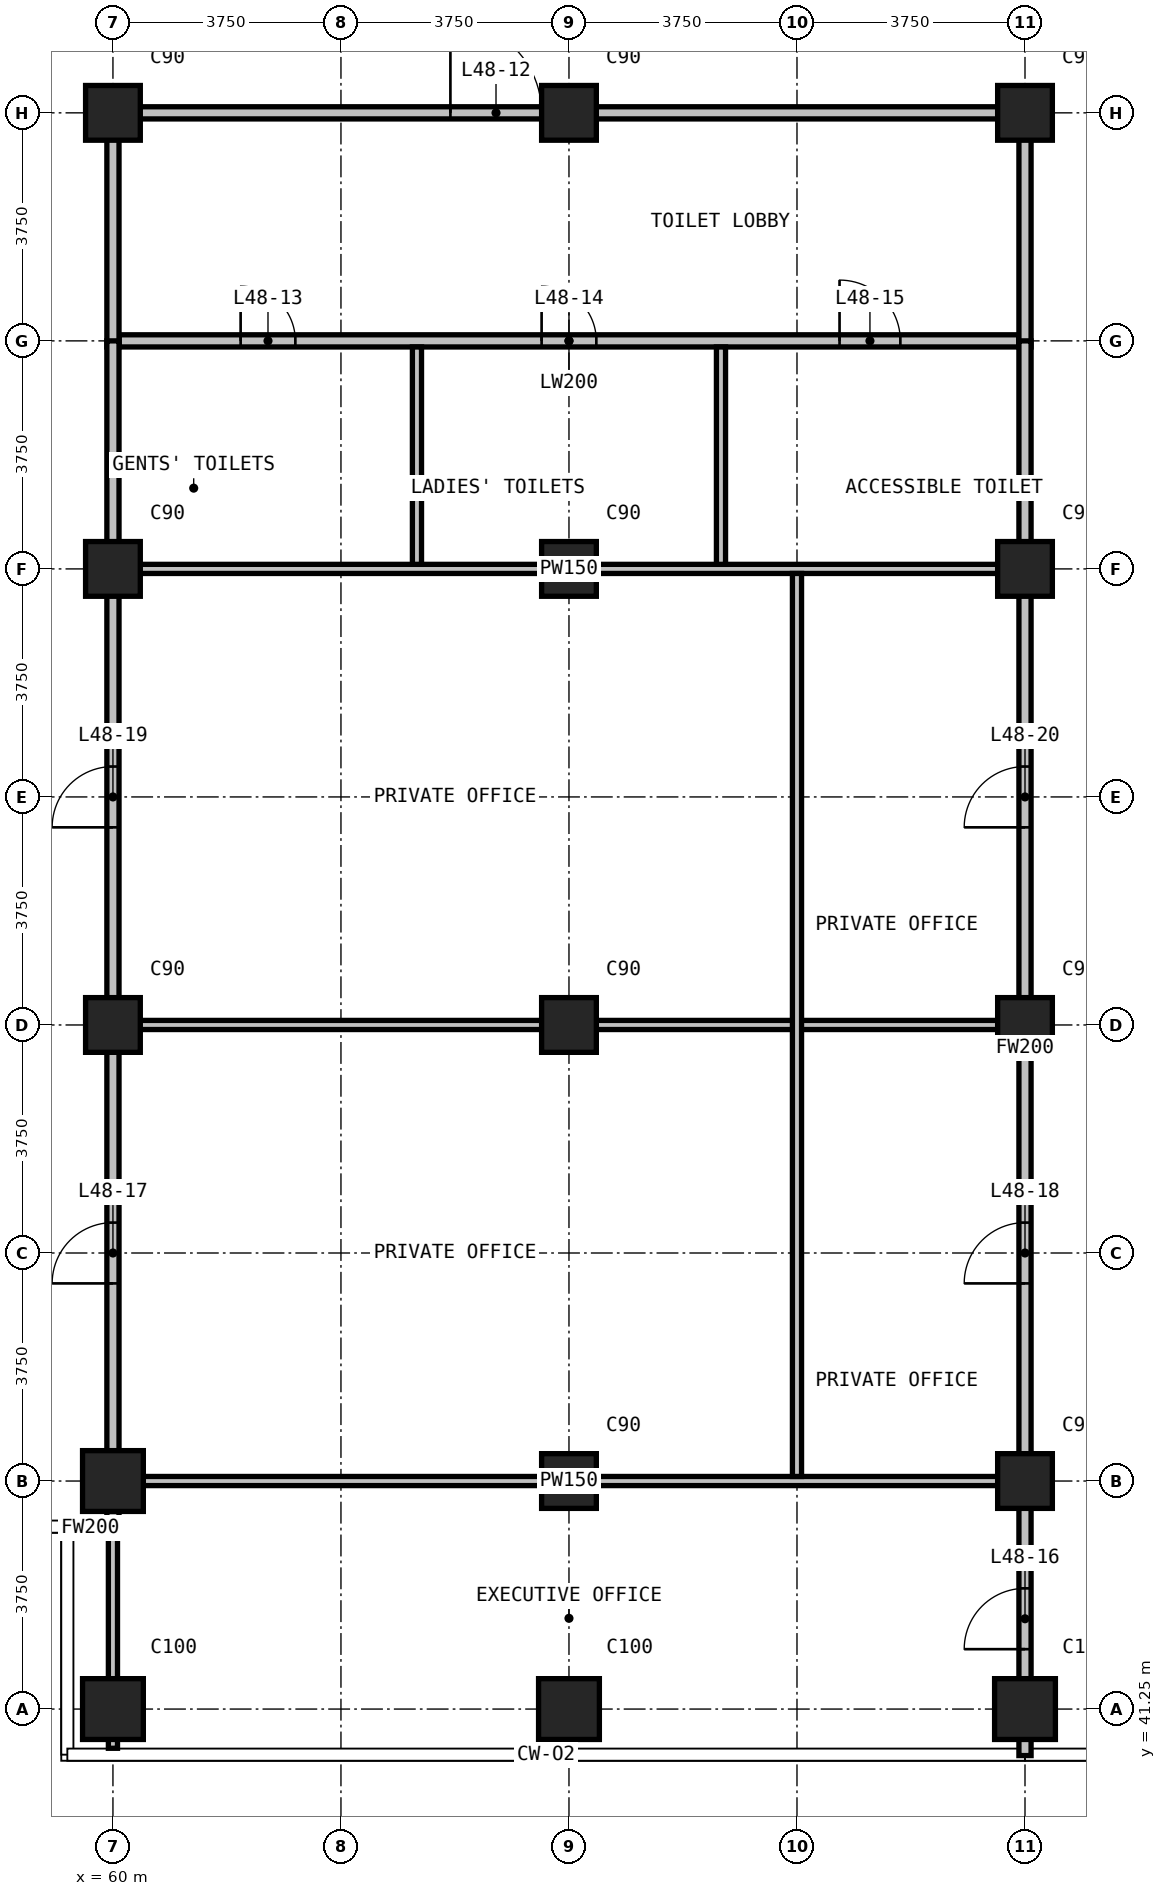
"""IFC4 building model, lengths in metres.
Left out: names, types, materials, properties, quantities, classifications, styles, units other than length and angle.
Written with IfcOpenShell. Run it as: python <this file> out.ifc"""

import sys

from ifc_helpers import new_model, si_unit, direction, frame, frame_2d, origin, origin_2d, place, context, subcontext, project, spatial, rectangle, extrude, element, fill, save


model = new_model("IFC4")
c1 = context("Model", 3, precision=1e-05, world=origin(), true_north=direction((0.0, 1.0)))
c2 = subcontext(c1, "Body", "Model", "MODEL_VIEW")
j1 = project(units=[si_unit("LENGTHUNIT", "METRE"), si_unit("PLANEANGLEUNIT", "RADIAN")], contexts=[c1])
p1 = place(None, origin())
s1 = spatial("IfcSite", under=j1, at=p1, CompositionType="ELEMENT")
p2 = place(p1, origin())
s2 = spatial("IfcBuilding", under=s1, at=p2, CompositionType="ELEMENT")
p3 = place(p2, frame((0.0, 0.0, 188.7)))
s3 = spatial("IfcBuildingStorey", under=s2, at=p3, CompositionType="ELEMENT", Elevation=188.7)
for number, where, z_axis, x_axis in (
    (1, (60.0, 41.25, 0.0), (0.0, 0.0, 1.0), (1.0, 0.0, 0.0)),
    (2, (60.0, 45.0, 0.0), (0.0, 0.0, 1.0), (1.0, 0.0, 0.0)),
):
    element("IfcColumn", number, at=place(p3, frame(where, z_axis=z_axis, x_axis=x_axis)), inside=s3, PredefinedType="COLUMN", context=c2, shape_type="SweptSolid", body=[
        extrude(rectangle(XDim=1.0, YDim=1.0, at=origin_2d()), origin(), (0.0, 0.0, 1.0), 3.6),
    ])
for number, where, z_axis, x_axis in (
    (3, (60.0, 52.5, 0.0), (0.0, 0.0, 1.0), (1.0, 0.0, 0.0)),
    (4, (60.0, 60.0, 0.0), (0.0, 0.0, 1.0), (1.0, 0.0, 0.0)),
    (5, (60.0, 67.5, 0.0), (0.0, 0.0, 1.0), (1.0, 0.0, 0.0)),
):
    element("IfcColumn", number, at=place(p3, frame(where, z_axis=z_axis, x_axis=x_axis)), inside=s3, PredefinedType="COLUMN", context=c2, shape_type="SweptSolid", body=[
        extrude(rectangle(XDim=0.9, YDim=0.9, at=origin_2d()), origin(), (0.0, 0.0, 1.0), 3.6),
    ])
p4 = place(p3, frame((67.5, 41.25, 0.0), z_axis=(0.0, 0.0, 1.0), x_axis=(1.0, 0.0, 0.0)))
e6 = element("IfcColumn", 6, at=p4, inside=s3, PredefinedType="COLUMN", context=c2, shape_type="SweptSolid", body=[
    extrude(rectangle(XDim=1.0, YDim=1.0, at=origin_2d()), origin(), (0.0, 0.0, 1.0), 3.6),
])
for number, where, z_axis, x_axis in (
    (7, (67.5, 45.0, 0.0), (0.0, 0.0, 1.0), (1.0, 0.0, 0.0)),
    (8, (67.5, 52.5, 0.0), (0.0, 0.0, 1.0), (1.0, 0.0, 0.0)),
    (9, (67.5, 60.0, 0.0), (0.0, 0.0, 1.0), (1.0, 0.0, 0.0)),
    (10, (67.5, 67.5, 0.0), (0.0, 0.0, 1.0), (1.0, 0.0, 0.0)),
):
    element("IfcColumn", number, at=place(p3, frame(where, z_axis=z_axis, x_axis=x_axis)), inside=s3, PredefinedType="COLUMN", context=c2, shape_type="SweptSolid", body=[
        extrude(rectangle(XDim=0.9, YDim=0.9, at=origin_2d()), origin(), (0.0, 0.0, 1.0), 3.6),
    ])
p5 = place(p3, frame((75.0, 41.25, 0.0), z_axis=(0.0, 0.0, 1.0), x_axis=(1.0, 0.0, 0.0)))
e11 = element("IfcColumn", 11, at=p5, inside=s3, PredefinedType="COLUMN", context=c2, shape_type="SweptSolid", body=[
    extrude(rectangle(XDim=1.0, YDim=1.0, at=origin_2d()), origin(), (0.0, 0.0, 1.0), 3.6),
])
for number, where, z_axis, x_axis in (
    (12, (75.0, 45.0, 0.0), (0.0, 0.0, 1.0), (1.0, 0.0, 0.0)),
    (13, (75.0, 52.5, 0.0), (0.0, 0.0, 1.0), (1.0, 0.0, 0.0)),
    (14, (75.0, 60.0, 0.0), (0.0, 0.0, 1.0), (1.0, 0.0, 0.0)),
    (15, (75.0, 67.5, 0.0), (0.0, 0.0, 1.0), (1.0, 0.0, 0.0)),
):
    element("IfcColumn", number, at=place(p3, frame(where, z_axis=z_axis, x_axis=x_axis)), inside=s3, PredefinedType="COLUMN", context=c2, shape_type="SweptSolid", body=[
        extrude(rectangle(XDim=0.9, YDim=0.9, at=origin_2d()), origin(), (0.0, 0.0, 1.0), 3.6),
    ])
p6 = place(p3, frame((60.1, 63.75, 0.0), z_axis=(0.0, 0.0, 1.0), x_axis=(1.0, 0.0, 0.0)))
e16 = element("IfcWall", 16, at=p6, inside=s3, PredefinedType="PARTITIONING", context=c2, shape_type="SweptSolid", body=[
    extrude(rectangle(XDim=14.8, YDim=0.2, at=frame_2d((7.4, 0.0))), origin(), (0.0, 0.0, 1.0), 3.3),
])
p7 = place(p6, frame((2.0, 0.0, 0.0)))
e17 = element("IfcOpeningElement", 17, at=p7, cuts=e16, PredefinedType="OPENING", context=c2, shape_type="SweptSolid", body=[
    extrude(rectangle(XDim=0.9, YDim=2.2, at=frame_2d((0.45, 1.1))), frame((0.0, 0.11, 0.0), z_axis=(0.0, -1.0, 0.0), x_axis=(1.0, 0.0, 0.0)), (0.0, 0.0, 1.0), 0.22),
])
p8 = place(p6, frame((6.95, 0.0, 0.0)))
e18 = element("IfcOpeningElement", 18, at=p8, cuts=e16, PredefinedType="OPENING", context=c2, shape_type="SweptSolid", body=[
    extrude(rectangle(XDim=0.9, YDim=2.2, at=frame_2d((0.45, 1.1))), frame((0.0, 0.11, 0.0), z_axis=(0.0, -1.0, 0.0), x_axis=(1.0, 0.0, 0.0)), (0.0, 0.0, 1.0), 0.22),
])
p9 = place(p6, frame((11.85, 0.0, 0.0)))
e19 = element("IfcOpeningElement", 19, at=p9, cuts=e16, PredefinedType="OPENING", context=c2, shape_type="SweptSolid", body=[
    extrude(rectangle(XDim=1.0, YDim=2.2, at=frame_2d((0.5, 1.1))), frame((0.0, 0.11, 0.0), z_axis=(0.0, -1.0, 0.0), x_axis=(1.0, 0.0, 0.0)), (0.0, 0.0, 1.0), 0.22),
])
p10 = place(p3, frame((60.1, 67.5, 0.0), z_axis=(0.0, 0.0, 1.0), x_axis=(1.0, 0.0, 0.0)))
e20 = element("IfcWall", 20, at=p10, inside=s3, PredefinedType="PARTITIONING", context=c2, shape_type="SweptSolid", body=[
    extrude(rectangle(XDim=14.8, YDim=0.2, at=frame_2d((7.4, 0.0))), origin(), (0.0, 0.0, 1.0), 3.3),
])
p11 = place(p10, frame((5.45, 0.0, 0.0)))
e21 = element("IfcOpeningElement", 21, at=p11, cuts=e20, PredefinedType="OPENING", context=c2, shape_type="SweptSolid", body=[
    extrude(rectangle(XDim=1.5, YDim=2.2, at=frame_2d((0.75, 1.1))), frame((0.0, 0.11, 0.0), z_axis=(0.0, -1.0, 0.0), x_axis=(1.0, 0.0, 0.0)), (0.0, 0.0, 1.0), 0.22),
])
for number, where, z_axis, x_axis in (
    (22, (60.0, 63.65, 0.0), (0.0, 0.0, 1.0), (0.0, 1.0, 0.0)),
    (23, (75.0, 63.65, 0.0), (0.0, 0.0, 1.0), (0.0, 1.0, 0.0)),
):
    element("IfcWall", number, at=place(p3, frame(where, z_axis=z_axis, x_axis=x_axis)), inside=s3, PredefinedType="PARTITIONING", context=c2, shape_type="SweptSolid", body=[
        extrude(rectangle(XDim=3.95, YDim=0.2, at=frame_2d((1.975, 0.0))), origin(), (0.0, 0.0, 1.0), 3.3),
    ])
p12 = place(p3, frame((59.355, 44.235, 0.0), z_axis=(0.0, 0.0, 1.0), x_axis=(1.0, 0.0, 0.0)))
e24 = element("IfcWall", 24, at=p12, inside=s3, PredefinedType="PARTITIONING", context=c2, shape_type="SweptSolid", body=[
    extrude(rectangle(XDim=0.545, YDim=0.2, at=frame_2d((0.272, 0.0))), origin(), (0.0, 0.0, 1.0), 3.3),
])
p13 = place(p3, frame((60.0, 44.135, 0.0), z_axis=(0.0, 0.0, 1.0), x_axis=(0.0, 1.0, 0.0)))
e25 = element("IfcWall", 25, at=p13, inside=s3, PredefinedType="PARTITIONING", context=c2, shape_type="SweptSolid", body=[
    extrude(rectangle(XDim=19.615, YDim=0.2, at=frame_2d((9.808, 0.0))), origin(), (0.0, 0.0, 1.0), 3.3),
])
p14 = place(p13, frame((4.115, 0.0, 0.0)))
e26 = element("IfcOpeningElement", 26, at=p14, cuts=e25, PredefinedType="OPENING", context=c2, shape_type="SweptSolid", body=[
    extrude(rectangle(XDim=1.0, YDim=2.2, at=frame_2d((0.5, 1.1))), frame((0.0, 0.11, 0.0), z_axis=(0.0, -1.0, 0.0), x_axis=(1.0, 0.0, 0.0)), (0.0, 0.0, 1.0), 0.22),
])
p15 = place(p13, frame((11.615, 0.0, 0.0)))
e27 = element("IfcOpeningElement", 27, at=p15, cuts=e25, PredefinedType="OPENING", context=c2, shape_type="SweptSolid", body=[
    extrude(rectangle(XDim=1.0, YDim=2.2, at=frame_2d((0.5, 1.1))), frame((0.0, 0.11, 0.0), z_axis=(0.0, -1.0, 0.0), x_axis=(1.0, 0.0, 0.0)), (0.0, 0.0, 1.0), 0.22),
])
p16 = place(p3, frame((75.0, 40.485, 0.0), z_axis=(0.0, 0.0, 1.0), x_axis=(0.0, 1.0, 0.0)))
e28 = element("IfcWall", 28, at=p16, inside=s3, PredefinedType="PARTITIONING", context=c2, shape_type="SweptSolid", body=[
    extrude(rectangle(XDim=23.265, YDim=0.2, at=frame_2d((11.632, 0.0))), origin(), (0.0, 0.0, 1.0), 3.3),
])
p17 = place(p16, frame((1.75, 0.0, 0.0)))
e29 = element("IfcOpeningElement", 29, at=p17, cuts=e28, PredefinedType="OPENING", context=c2, shape_type="SweptSolid", body=[
    extrude(rectangle(XDim=1.0, YDim=2.2, at=frame_2d((0.5, 1.1))), frame((0.0, 0.11, 0.0), z_axis=(0.0, -1.0, 0.0), x_axis=(1.0, 0.0, 0.0)), (0.0, 0.0, 1.0), 0.22),
])
p18 = place(p16, frame((7.765, 0.0, 0.0)))
e30 = element("IfcOpeningElement", 30, at=p18, cuts=e28, PredefinedType="OPENING", context=c2, shape_type="SweptSolid", body=[
    extrude(rectangle(XDim=1.0, YDim=2.2, at=frame_2d((0.5, 1.1))), frame((0.0, 0.11, 0.0), z_axis=(0.0, -1.0, 0.0), x_axis=(1.0, 0.0, 0.0)), (0.0, 0.0, 1.0), 0.22),
])
p19 = place(p16, frame((15.265, 0.0, 0.0)))
e31 = element("IfcOpeningElement", 31, at=p19, cuts=e28, PredefinedType="OPENING", context=c2, shape_type="SweptSolid", body=[
    extrude(rectangle(XDim=1.0, YDim=2.2, at=frame_2d((0.5, 1.1))), frame((0.0, 0.11, 0.0), z_axis=(0.0, -1.0, 0.0), x_axis=(1.0, 0.0, 0.0)), (0.0, 0.0, 1.0), 0.22),
])
for number, where, z_axis, x_axis in (
    (32, (60.1, 45.0, 0.0), (0.0, 0.0, 1.0), (1.0, 0.0, 0.0)),
    (33, (60.1, 52.5, 0.0), (0.0, 0.0, 1.0), (1.0, 0.0, 0.0)),
    (34, (60.1, 60.0, 0.0), (0.0, 0.0, 1.0), (1.0, 0.0, 0.0)),
):
    element("IfcWall", number, at=place(p3, frame(where, z_axis=z_axis, x_axis=x_axis)), inside=s3, PredefinedType="PARTITIONING", context=c2, shape_type="SweptSolid", body=[
        extrude(rectangle(XDim=14.8, YDim=0.15, at=frame_2d((7.4, 0.0))), origin(), (0.0, 0.0, 1.0), 3.3),
    ])
p20 = place(p3, frame((60.0, 40.605, 0.0), z_axis=(0.0, 0.0, 1.0), x_axis=(0.0, 1.0, 0.0)))
e35 = element("IfcWall", 35, at=p20, inside=s3, PredefinedType="PARTITIONING", context=c2, shape_type="SweptSolid", body=[
    extrude(rectangle(XDim=3.6, YDim=0.15, at=frame_2d((1.8, 0.0))), origin(), (0.0, 0.0, 1.0), 3.3),
])
for number, where, z_axis, x_axis in (
    (36, (65.0, 60.075, 0.0), (0.0, 0.0, 1.0), (0.0, 1.0, 0.0)),
    (37, (70.0, 60.075, 0.0), (0.0, 0.0, 1.0), (0.0, 1.0, 0.0)),
):
    element("IfcWall", number, at=place(p3, frame(where, z_axis=z_axis, x_axis=x_axis)), inside=s3, PredefinedType="PARTITIONING", context=c2, shape_type="SweptSolid", body=[
        extrude(rectangle(XDim=3.575, YDim=0.15, at=frame_2d((1.788, 0.0))), origin(), (0.0, 0.0, 1.0), 3.3),
    ])
p21 = place(p3, frame((71.25, 45.075, 0.0), z_axis=(0.0, 0.0, 1.0), x_axis=(0.0, 1.0, 0.0)))
e38 = element("IfcWall", 38, at=p21, inside=s3, PredefinedType="PARTITIONING", context=c2, shape_type="SweptSolid", body=[
    extrude(rectangle(XDim=14.85, YDim=0.15, at=frame_2d((7.425, 0.0))), origin(), (0.0, 0.0, 1.0), 3.3),
])
p22 = place(p11, origin())
e39 = element("IfcDoor", 39, at=p22, inside=s3, OperationType="DOUBLE_DOOR_SINGLE_SWING", PredefinedType="DOOR", context=c2, shape_type="SweptSolid", body=[
    extrude(rectangle(XDim=1.5, YDim=2.2, at=frame_2d((0.75, 1.1))), frame((0.0, 0.025, 0.0), z_axis=(0.0, -1.0, 0.0), x_axis=(1.0, 0.0, 0.0)), (0.0, 0.0, 1.0), 0.05),
])
fill(e21, e39)
p23 = place(p7, origin())
e40 = element("IfcDoor", 40, at=p23, inside=s3, OperationType="SINGLE_SWING_LEFT", PredefinedType="DOOR", context=c2, shape_type="SweptSolid", body=[
    extrude(rectangle(XDim=0.9, YDim=2.2, at=frame_2d((0.45, 1.1))), frame((0.0, 0.025, 0.0), z_axis=(0.0, -1.0, 0.0), x_axis=(1.0, 0.0, 0.0)), (0.0, 0.0, 1.0), 0.05),
])
fill(e17, e40)
p24 = place(p8, origin())
e41 = element("IfcDoor", 41, at=p24, inside=s3, OperationType="SINGLE_SWING_LEFT", PredefinedType="DOOR", context=c2, shape_type="SweptSolid", body=[
    extrude(rectangle(XDim=0.9, YDim=2.2, at=frame_2d((0.45, 1.1))), frame((0.0, 0.025, 0.0), z_axis=(0.0, -1.0, 0.0), x_axis=(1.0, 0.0, 0.0)), (0.0, 0.0, 1.0), 0.05),
])
fill(e18, e41)
p25 = place(p9, origin())
e42 = element("IfcDoor", 42, at=p25, inside=s3, OperationType="SINGLE_SWING_LEFT", PredefinedType="DOOR", context=c2, shape_type="SweptSolid", body=[
    extrude(rectangle(XDim=1.0, YDim=2.2, at=frame_2d((0.5, 1.1))), frame((0.0, 0.025, 0.0), z_axis=(0.0, -1.0, 0.0), x_axis=(1.0, 0.0, 0.0)), (0.0, 0.0, 1.0), 0.05),
])
fill(e19, e42)
p26 = place(p17, origin())
e43 = element("IfcDoor", 43, at=p26, inside=s3, OperationType="SINGLE_SWING_LEFT", PredefinedType="DOOR", context=c2, shape_type="SweptSolid", body=[
    extrude(rectangle(XDim=1.0, YDim=2.2, at=frame_2d((0.5, 1.1))), frame((0.0, 0.025, 0.0), z_axis=(0.0, -1.0, 0.0), x_axis=(1.0, 0.0, 0.0)), (0.0, 0.0, 1.0), 0.05),
])
fill(e29, e43)
p27 = place(p14, origin())
e44 = element("IfcDoor", 44, at=p27, inside=s3, OperationType="SINGLE_SWING_LEFT", PredefinedType="DOOR", context=c2, shape_type="SweptSolid", body=[
    extrude(rectangle(XDim=1.0, YDim=2.2, at=frame_2d((0.5, 1.1))), frame((0.0, 0.025, 0.0), z_axis=(0.0, -1.0, 0.0), x_axis=(1.0, 0.0, 0.0)), (0.0, 0.0, 1.0), 0.05),
])
fill(e26, e44)
p28 = place(p18, origin())
e45 = element("IfcDoor", 45, at=p28, inside=s3, OperationType="SINGLE_SWING_RIGHT", PredefinedType="DOOR", context=c2, shape_type="SweptSolid", body=[
    extrude(rectangle(XDim=1.0, YDim=2.2, at=frame_2d((0.5, 1.1))), frame((0.0, 0.025, 0.0), z_axis=(0.0, -1.0, 0.0), x_axis=(1.0, 0.0, 0.0)), (0.0, 0.0, 1.0), 0.05),
])
fill(e30, e45)
p29 = place(p15, origin())
e46 = element("IfcDoor", 46, at=p29, inside=s3, OperationType="SINGLE_SWING_RIGHT", PredefinedType="DOOR", context=c2, shape_type="SweptSolid", body=[
    extrude(rectangle(XDim=1.0, YDim=2.2, at=frame_2d((0.5, 1.1))), frame((0.0, 0.025, 0.0), z_axis=(0.0, -1.0, 0.0), x_axis=(1.0, 0.0, 0.0)), (0.0, 0.0, 1.0), 0.05),
])
fill(e27, e46)
p30 = place(p19, origin())
e47 = element("IfcDoor", 47, at=p30, inside=s3, OperationType="SINGLE_SWING_RIGHT", PredefinedType="DOOR", context=c2, shape_type="SweptSolid", body=[
    extrude(rectangle(XDim=1.0, YDim=2.2, at=frame_2d((0.5, 1.1))), frame((0.0, 0.025, 0.0), z_axis=(0.0, -1.0, 0.0), x_axis=(1.0, 0.0, 0.0)), (0.0, 0.0, 1.0), 0.05),
])
fill(e31, e47)
save(model, sys.argv[1])
